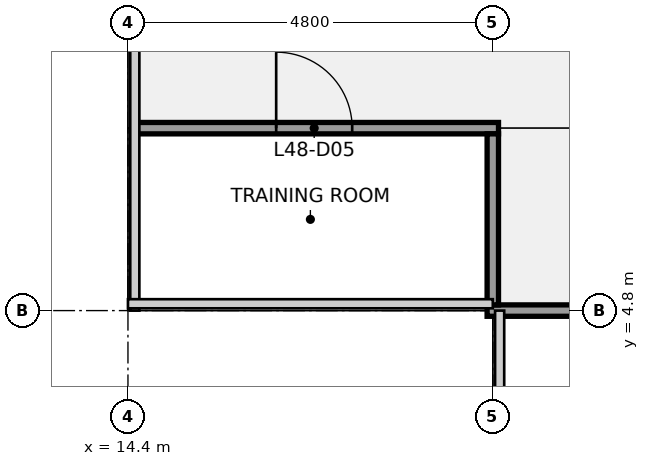
"""IFC4 building model, lengths in metres.
Left out: names, types, materials, properties, quantities, classifications, styles, units other than length and angle.
Written with IfcOpenShell. Run it as: python <this file> out.ifc"""

import sys

from ifc_helpers import new_model, si_unit, direction, frame, frame_2d, origin, place, context, subcontext, project, spatial, rectangle, extrude, element, fill, save


model = new_model("IFC4")
c1 = context("Model", 3, precision=1e-05, world=origin(), true_north=direction((0.0, 1.0)))
c2 = subcontext(c1, "Body", "Model", "MODEL_VIEW")
j1 = project(units=[si_unit("LENGTHUNIT", "METRE"), si_unit("PLANEANGLEUNIT", "RADIAN")], contexts=[c1])
p1 = place(None, origin())
s1 = spatial("IfcSite", under=j1, at=p1, CompositionType="ELEMENT")
p2 = place(p1, origin())
s2 = spatial("IfcBuilding", under=s1, at=p2, CompositionType="ELEMENT")
p3 = place(p2, frame((0.0, 0.0, 221.2)))
s3 = spatial("IfcBuildingStorey", under=s2, at=p3, CompositionType="ELEMENT", Elevation=221.2)
p4 = place(p3, frame((19.125, 4.8, 0.0), z_axis=(0.0, 0.0, 1.0), x_axis=(1.0, 0.0, 0.0)))
e1 = element("IfcWall", 1, at=p4, inside=s3, PredefinedType="PARTITIONING", context=c2, shape_type="SweptSolid", body=[
    extrude(rectangle(XDim=19.35, YDim=0.15, at=frame_2d((9.675, 0.0))), origin(), (0.0, 0.0, 1.0), 2.87),
])
p5 = place(p4, frame((4.375, 0.0, 0.0)))
e2 = element("IfcOpeningElement", 2, at=p5, cuts=e1, PredefinedType="OPENING", context=c2, shape_type="SweptSolid", body=[
    extrude(rectangle(XDim=1.0, YDim=2.1, at=frame_2d((0.5, 1.05))), frame((0.0, 0.085, 0.0), z_axis=(0.0, -1.0, 0.0), x_axis=(1.0, 0.0, 0.0)), (0.0, 0.0, 1.0), 0.17),
])
p6 = place(p4, frame((10.375, 0.0, 0.0)))
e3 = element("IfcOpeningElement", 3, at=p6, cuts=e1, PredefinedType="OPENING", context=c2, shape_type="SweptSolid", body=[
    extrude(rectangle(XDim=1.0, YDim=2.1, at=frame_2d((0.5, 1.05))), frame((0.0, 0.085, 0.0), z_axis=(0.0, -1.0, 0.0), x_axis=(1.0, 0.0, 0.0)), (0.0, 0.0, 1.0), 0.17),
])
p7 = place(p4, frame((13.975, 0.0, 0.0)))
e4 = element("IfcOpeningElement", 4, at=p7, cuts=e1, PredefinedType="OPENING", context=c2, shape_type="SweptSolid", body=[
    extrude(rectangle(XDim=1.0, YDim=2.1, at=frame_2d((0.5, 1.05))), frame((0.0, 0.085, 0.0), z_axis=(0.0, -1.0, 0.0), x_axis=(1.0, 0.0, 0.0)), (0.0, 0.0, 1.0), 0.17),
])
p8 = place(p4, frame((17.575, 0.0, 0.0)))
e5 = element("IfcOpeningElement", 5, at=p8, cuts=e1, PredefinedType="OPENING", context=c2, shape_type="SweptSolid", body=[
    extrude(rectangle(XDim=1.0, YDim=2.1, at=frame_2d((0.5, 1.05))), frame((0.0, 0.085, 0.0), z_axis=(0.0, -1.0, 0.0), x_axis=(1.0, 0.0, 0.0)), (0.0, 0.0, 1.0), 0.17),
])
p9 = place(p3, frame((14.5, 7.2, 0.0), z_axis=(0.0, 0.0, 1.0), x_axis=(1.0, 0.0, 0.0)))
e6 = element("IfcWall", 6, at=p9, inside=s3, PredefinedType="PARTITIONING", context=c2, shape_type="SweptSolid", body=[
    extrude(rectangle(XDim=4.775, YDim=0.15, at=frame_2d((2.387, 0.0))), origin(), (0.0, 0.0, 1.0), 2.87),
])
p10 = place(p9, frame((1.85, 0.0, 0.0)))
e7 = element("IfcOpeningElement", 7, at=p10, cuts=e6, PredefinedType="OPENING", context=c2, shape_type="SweptSolid", body=[
    extrude(rectangle(XDim=1.0, YDim=2.1, at=frame_2d((0.5, 1.05))), frame((0.0, 0.085, 0.0), z_axis=(0.0, -1.0, 0.0), x_axis=(1.0, 0.0, 0.0)), (0.0, 0.0, 1.0), 0.17),
])
p11 = place(p3, frame((19.2, 4.875, 0.0), z_axis=(0.0, 0.0, 1.0), x_axis=(0.0, 1.0, 0.0)))
e8 = element("IfcWall", 8, at=p11, inside=s3, PredefinedType="PARTITIONING", context=c2, shape_type="SweptSolid", body=[
    extrude(rectangle(XDim=2.25, YDim=0.15, at=frame_2d((1.125, 0.0))), origin(), (0.0, 0.0, 1.0), 2.87),
])
p12 = place(p10, origin())
e9 = element("IfcDoor", 9, at=p12, inside=s3, OperationType="SINGLE_SWING_LEFT", PredefinedType="DOOR", context=c2, shape_type="SweptSolid", body=[
    extrude(rectangle(XDim=1.0, YDim=2.1, at=frame_2d((0.5, 1.05))), frame((0.0, 0.025, 0.0), z_axis=(0.0, -1.0, 0.0), x_axis=(1.0, 0.0, 0.0)), (0.0, 0.0, 1.0), 0.05),
])
fill(e7, e9)
save(model, sys.argv[1])
